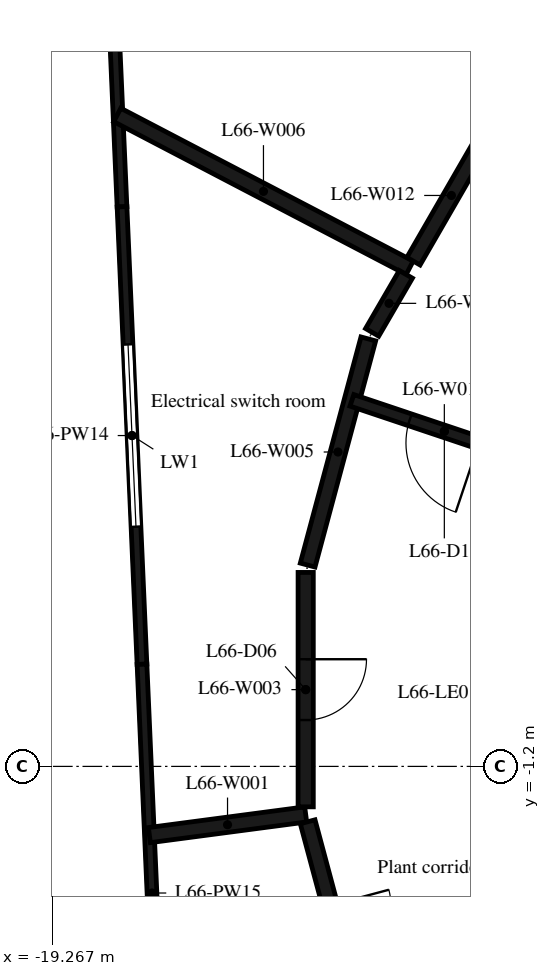
"""IFC4 building model, lengths in metres.
Left out: names, types, materials, properties, quantities, classifications, styles, units other than length and angle.
Written with IfcOpenShell. Run it as: python <this file> out.ifc"""

import sys

from ifc_helpers import new_model, si_unit, direction, frame, frame_2d, origin, place, context, subcontext, project, spatial, rectangle, extrude, element, fill, save


model = new_model("IFC4")
c1 = context("Model", 3, precision=1e-05, world=origin(), true_north=direction((0.0, 1.0)))
c2 = subcontext(c1, "Body", "Model", "MODEL_VIEW")
j1 = project(units=[si_unit("LENGTHUNIT", "METRE"), si_unit("PLANEANGLEUNIT", "RADIAN")], contexts=[c1])
p1 = place(None, origin())
s1 = spatial("IfcSite", under=j1, at=p1, CompositionType="ELEMENT")
p2 = place(p1, origin())
s2 = spatial("IfcBuilding", under=s1, at=p2, CompositionType="ELEMENT")
p3 = place(p2, frame((0.0, 0.0, 258.2)))
s3 = spatial("IfcBuildingStorey", under=s2, at=p3, CompositionType="ELEMENT", Elevation=258.2)
p4 = place(p3, frame((-18.449, 15.525, 0.0), z_axis=(0.0, 0.0, 1.0), x_axis=(0.043639829449, -0.999047328852, 0.0)))
e1 = element("IfcWall", 1, at=p4, inside=s3, PredefinedType="STANDARD", context=c2, shape_type="SweptSolid", body=[
    extrude(rectangle(XDim=7.53, YDim=0.16, at=frame_2d((3.765, 0.0))), origin(), (0.0, 0.0, 1.0), 4.75),
])
p5 = place(p4, frame((1.677, 0.0, 1.0)))
e2 = element("IfcOpeningElement", 2, at=p5, cuts=e1, PredefinedType="OPENING", context=c2, shape_type="SweptSolid", body=[
    extrude(rectangle(XDim=3.0, YDim=2.2, at=frame_2d((1.5, 1.1))), frame((0.0, 0.09, 0.0), z_axis=(0.0, -1.0, 0.0), x_axis=(1.0, 0.0, 0.0)), (0.0, 0.0, 1.0), 0.18),
])
p6 = place(p3, frame((-18.121, 8.002, 0.0), z_axis=(0.0, 0.0, 1.0), x_axis=(0.043608881799, -0.999048680209, 0.0)))
e3 = element("IfcWall", 3, at=p6, inside=s3, PredefinedType="STANDARD", context=c2, shape_type="SweptSolid", body=[
    extrude(rectangle(XDim=7.53, YDim=0.16, at=frame_2d((3.765, 0.0))), origin(), (0.0, 0.0, 1.0), 4.75),
])
p7 = place(p6, frame((2.265, 0.0, 1.0)))
e4 = element("IfcOpeningElement", 4, at=p7, cuts=e3, PredefinedType="OPENING", context=c2, shape_type="SweptSolid", body=[
    extrude(rectangle(XDim=3.0, YDim=2.2, at=frame_2d((1.5, 1.1))), frame((0.0, 0.09, 0.0), z_axis=(0.0, -1.0, 0.0), x_axis=(1.0, 0.0, 0.0)), (0.0, 0.0, 1.0), 0.18),
])
p8 = place(p3, frame((-17.792, 0.479, 0.0), z_axis=(0.0, 0.0, 1.0), x_axis=(0.043639829449, -0.999047328852, 0.0)))
e5 = element("IfcWall", 5, at=p8, inside=s3, PredefinedType="STANDARD", context=c2, shape_type="SweptSolid", body=[
    extrude(rectangle(XDim=7.53, YDim=0.16, at=frame_2d((3.765, 0.0))), origin(), (0.0, 0.0, 1.0), 4.75),
])
p9 = place(p3, frame((-15.1, -1.99, 0.0), z_axis=(0.0, 0.0, 1.0), x_axis=(-0.991385897114, -0.130973291185, 0.0)))
e6 = element("IfcWall", 6, at=p9, inside=s3, PredefinedType="PARTITIONING", context=c2, shape_type="SweptSolid", body=[
    extrude(rectangle(XDim=2.593, YDim=0.25, at=frame_2d((1.296, 0.0))), origin(), (0.0, 0.0, 1.0), 4.75),
])
p10 = place(p3, frame((-15.068, -2.111, 0.0), z_axis=(0.0, 0.0, 1.0), x_axis=(0.259059323171, -0.965861411942, 0.0)))
e7 = element("IfcWall", 7, at=p10, inside=s3, PredefinedType="PARTITIONING", context=c2, shape_type="SweptSolid", body=[
    extrude(rectangle(XDim=3.851, YDim=0.25, at=frame_2d((1.925, 0.0))), origin(), (0.0, 0.0, 1.0), 4.75),
])
p11 = place(p10, frame((1.425, 0.0, 0.0)))
e8 = element("IfcOpeningElement", 8, at=p11, cuts=e7, PredefinedType="OPENING", context=c2, shape_type="SweptSolid", body=[
    extrude(rectangle(XDim=1.0, YDim=2.1, at=frame_2d((0.5, 1.05))), frame((0.0, 0.135, 0.0), z_axis=(0.0, -1.0, 0.0), x_axis=(1.0, 0.0, 0.0)), (0.0, 0.0, 1.0), 0.27),
])
p12 = place(p3, frame((-15.1, 1.99, 0.0), z_axis=(0.0, 0.0, 1.0), x_axis=(0.0, -1.0, 0.0)))
e9 = element("IfcWall", 9, at=p12, inside=s3, PredefinedType="PARTITIONING", context=c2, shape_type="SweptSolid", body=[
    extrude(rectangle(XDim=3.855, YDim=0.25, at=frame_2d((1.927, 0.0))), origin(), (0.0, 0.0, 1.0), 4.75),
])
p13 = place(p12, frame((1.427, 0.0, 0.0)))
e10 = element("IfcOpeningElement", 10, at=p13, cuts=e9, PredefinedType="OPENING", context=c2, shape_type="SweptSolid", body=[
    extrude(rectangle(XDim=1.0, YDim=2.1, at=frame_2d((0.5, 1.05))), frame((0.0, 0.135, 0.0), z_axis=(0.0, -1.0, 0.0), x_axis=(1.0, 0.0, 0.0)), (0.0, 0.0, 1.0), 0.27),
])
p14 = place(p3, frame((-14.07, 5.83, 0.0), z_axis=(0.0, 0.0, 1.0), x_axis=(-0.259059323171, -0.965861411942, 0.0)))
e11 = element("IfcWall", 11, at=p14, inside=s3, PredefinedType="PARTITIONING", context=c2, shape_type="SweptSolid", body=[
    extrude(rectangle(XDim=3.851, YDim=0.25, at=frame_2d((1.925, 0.0))), origin(), (0.0, 0.0, 1.0), 4.75),
])
p15 = place(p3, frame((-13.39, 7.0, 0.0), z_axis=(0.0, 0.0, 1.0), x_axis=(-0.886293445751, 0.463124095701, 0.0)))
e12 = element("IfcWall", 12, at=p15, inside=s3, PredefinedType="PARTITIONING", context=c2, shape_type="SweptSolid", body=[
    extrude(rectangle(XDim=5.426, YDim=0.25, at=frame_2d((2.713, 0.0))), origin(), (0.0, 0.0, 1.0), 4.75),
])
p16 = place(p3, frame((-13.453, 6.892, 0.0), z_axis=(0.0, 0.0, 1.0), x_axis=(-0.502370413152, -0.864652512857, 0.0)))
e13 = element("IfcWall", 13, at=p16, inside=s3, PredefinedType="PARTITIONING", context=c2, shape_type="SweptSolid", body=[
    extrude(rectangle(XDim=1.103, YDim=0.25, at=frame_2d((0.552, 0.0))), origin(), (0.0, 0.0, 1.0), 4.75),
])
p17 = place(p3, frame((-12.08, 9.27, 0.0), z_axis=(0.0, 0.0, 1.0), x_axis=(-0.499821239653, -0.866128586522, 0.0)))
e14 = element("IfcWall", 14, at=p17, inside=s3, PredefinedType="PARTITIONING", context=c2, shape_type="SweptSolid", body=[
    extrude(rectangle(XDim=2.496, YDim=0.25, at=frame_2d((1.248, 0.0))), origin(), (0.0, 0.0, 1.0), 4.75),
])
p18 = place(p3, frame((-11.3, 3.8, 0.0), z_axis=(0.0, 0.0, 1.0), x_axis=(-0.94805712629, 0.318100118345, 0.0)))
e15 = element("IfcWall", 15, at=p18, inside=s3, PredefinedType="PARTITIONING", context=c2, shape_type="SweptSolid", body=[
    extrude(rectangle(XDim=3.207, YDim=0.2, at=frame_2d((1.603, 0.0))), origin(), (0.0, 0.0, 1.0), 4.75),
])
p19 = place(p18, frame((1.003, 0.0, 0.0)))
e16 = element("IfcOpeningElement", 16, at=p19, cuts=e15, PredefinedType="OPENING", context=c2, shape_type="SweptSolid", body=[
    extrude(rectangle(XDim=1.2, YDim=2.1, at=frame_2d((0.6, 1.05))), frame((0.0, 0.11, 0.0), z_axis=(0.0, -1.0, 0.0), x_axis=(1.0, 0.0, 0.0)), (0.0, 0.0, 1.0), 0.22),
])
p20 = place(p7, origin())
e17 = element("IfcWindow", 17, at=p20, inside=s3, PartitioningType="SINGLE_PANEL", PredefinedType="WINDOW", context=c2, shape_type="SweptSolid", body=[
    extrude(rectangle(XDim=3.0, YDim=2.2, at=frame_2d((1.5, 1.1))), frame((0.0, 0.03, 0.0), z_axis=(0.0, -1.0, 0.0), x_axis=(1.0, 0.0, 0.0)), (0.0, 0.0, 1.0), 0.06),
])
fill(e4, e17)
p21 = place(p13, origin())
e18 = element("IfcDoor", 18, at=p21, inside=s3, OperationType="SINGLE_SWING_LEFT", PredefinedType="DOOR", context=c2, shape_type="SweptSolid", body=[
    extrude(rectangle(XDim=1.0, YDim=2.1, at=frame_2d((0.5, 1.05))), frame((0.0, 0.025, 0.0), z_axis=(0.0, -1.0, 0.0), x_axis=(1.0, 0.0, 0.0)), (0.0, 0.0, 1.0), 0.05),
])
fill(e10, e18)
p22 = place(p19, origin())
e19 = element("IfcDoor", 19, at=p22, inside=s3, OperationType="SINGLE_SWING_LEFT", PredefinedType="DOOR", context=c2, shape_type="SweptSolid", body=[
    extrude(rectangle(XDim=1.2, YDim=2.1, at=frame_2d((0.6, 1.05))), frame((0.0, 0.025, 0.0), z_axis=(0.0, -1.0, 0.0), x_axis=(1.0, 0.0, 0.0)), (0.0, 0.0, 1.0), 0.05),
])
fill(e16, e19)
save(model, sys.argv[1])
